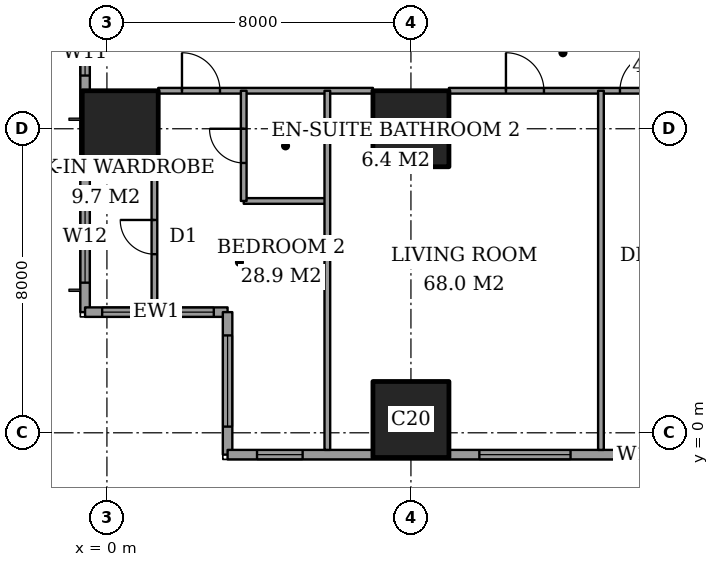
"""IFC4 building model, lengths in metres.
Left out: names, types, materials, properties, quantities, classifications, styles, units other than length and angle.
Written with IfcOpenShell. Run it as: python <this file> out.ifc"""

import sys

from ifc_helpers import new_model, si_unit, direction, frame, frame_2d, origin, origin_2d, place, context, subcontext, project, spatial, rectangle, extrude, element, fill, save


model = new_model("IFC4")
c1 = context("Model", 3, precision=1e-05, world=origin(), true_north=direction((0.0, 1.0)))
c2 = subcontext(c1, "Body", "Model", "MODEL_VIEW")
j1 = project(units=[si_unit("LENGTHUNIT", "METRE"), si_unit("PLANEANGLEUNIT", "RADIAN")], contexts=[c1])
p1 = place(None, origin())
s1 = spatial("IfcSite", under=j1, at=p1, CompositionType="ELEMENT")
p2 = place(p1, origin())
s2 = spatial("IfcBuilding", under=s1, at=p2, CompositionType="ELEMENT")
p3 = place(p2, frame((0.0, 0.0, 143.0)))
s3 = spatial("IfcBuildingStorey", under=s2, at=p3, CompositionType="ELEMENT", Elevation=143.0)
for number, where, z_axis, x_axis in (
    (1, (0.35, 8.0, 0.0), (0.0, 0.0, 1.0), (1.0, 0.0, 0.0)),
    (2, (8.0, 0.35, 0.0), (0.0, 0.0, 1.0), (1.0, 0.0, 0.0)),
    (3, (8.0, 8.0, 0.0), (0.0, 0.0, 1.0), (1.0, 0.0, 0.0)),
):
    element("IfcColumn", number, at=place(p3, frame(where, z_axis=z_axis, x_axis=x_axis)), inside=s3, PredefinedType="COLUMN", context=c2, shape_type="SweptSolid", body=[
        extrude(rectangle(XDim=2.0, YDim=2.0, at=origin_2d()), origin(), (0.0, 0.0, 1.0), 3.6),
    ])
p4 = place(p3, frame((-0.575, 44.825, 0.0), z_axis=(0.0, 0.0, 1.0), x_axis=(0.0, -1.0, 0.0)))
e4 = element("IfcWall", 4, at=p4, inside=s3, PredefinedType="SOLIDWALL", context=c2, shape_type="SweptSolid", body=[
    extrude(rectangle(XDim=41.65, YDim=0.25, at=frame_2d((20.825, 0.0))), origin(), (0.0, 0.0, 1.0), 3.6),
])
p5 = place(p4, frame((0.775, 0.0, 0.4)))
e5 = element("IfcOpeningElement", 5, at=p5, cuts=e4, PredefinedType="OPENING", context=c2, shape_type="SweptSolid", body=[
    extrude(rectangle(XDim=2.4, YDim=2.2, at=frame_2d((1.2, 1.1))), frame((0.0, 0.135, 0.0), z_axis=(0.0, -1.0, 0.0), x_axis=(1.0, 0.0, 0.0)), (0.0, 0.0, 1.0), 0.27),
])
p6 = place(p4, frame((6.1, 0.0, 0.4)))
e6 = element("IfcOpeningElement", 6, at=p6, cuts=e4, PredefinedType="OPENING", context=c2, shape_type="SweptSolid", body=[
    extrude(rectangle(XDim=1.2, YDim=2.2, at=frame_2d((0.6, 1.1))), frame((0.0, 0.135, 0.0), z_axis=(0.0, -1.0, 0.0), x_axis=(1.0, 0.0, 0.0)), (0.0, 0.0, 1.0), 0.27),
])
p7 = place(p4, frame((8.425, 0.0, 0.4)))
e7 = element("IfcOpeningElement", 7, at=p7, cuts=e4, PredefinedType="OPENING", context=c2, shape_type="SweptSolid", body=[
    extrude(rectangle(XDim=2.4, YDim=2.2, at=frame_2d((1.2, 1.1))), frame((0.0, 0.135, 0.0), z_axis=(0.0, -1.0, 0.0), x_axis=(1.0, 0.0, 0.0)), (0.0, 0.0, 1.0), 0.27),
])
p8 = place(p4, frame((15.625, 0.0, 0.4)))
e8 = element("IfcOpeningElement", 8, at=p8, cuts=e4, PredefinedType="OPENING", context=c2, shape_type="SweptSolid", body=[
    extrude(rectangle(XDim=2.4, YDim=2.2, at=frame_2d((1.2, 1.1))), frame((0.0, 0.135, 0.0), z_axis=(0.0, -1.0, 0.0), x_axis=(1.0, 0.0, 0.0)), (0.0, 0.0, 1.0), 0.27),
])
p9 = place(p4, frame((23.625, 0.0, 0.4)))
e9 = element("IfcOpeningElement", 9, at=p9, cuts=e4, PredefinedType="OPENING", context=c2, shape_type="SweptSolid", body=[
    extrude(rectangle(XDim=2.4, YDim=2.2, at=frame_2d((1.2, 1.1))), frame((0.0, 0.135, 0.0), z_axis=(0.0, -1.0, 0.0), x_axis=(1.0, 0.0, 0.0)), (0.0, 0.0, 1.0), 0.27),
])
p10 = place(p4, frame((30.625, 0.0, 0.4)))
e10 = element("IfcOpeningElement", 10, at=p10, cuts=e4, PredefinedType="OPENING", context=c2, shape_type="SweptSolid", body=[
    extrude(rectangle(XDim=2.4, YDim=2.2, at=frame_2d((1.2, 1.1))), frame((0.0, 0.135, 0.0), z_axis=(0.0, -1.0, 0.0), x_axis=(1.0, 0.0, 0.0)), (0.0, 0.0, 1.0), 0.27),
])
p11 = place(p4, frame((34.225, 0.0, 0.4)))
e11 = element("IfcOpeningElement", 11, at=p11, cuts=e4, PredefinedType="OPENING", context=c2, shape_type="SweptSolid", body=[
    extrude(rectangle(XDim=1.2, YDim=2.2, at=frame_2d((0.6, 1.1))), frame((0.0, 0.135, 0.0), z_axis=(0.0, -1.0, 0.0), x_axis=(1.0, 0.0, 0.0)), (0.0, 0.0, 1.0), 0.27),
])
p12 = place(p4, frame((38.475, 0.0, 0.4)))
e12 = element("IfcOpeningElement", 12, at=p12, cuts=e4, PredefinedType="OPENING", context=c2, shape_type="SweptSolid", body=[
    extrude(rectangle(XDim=2.4, YDim=2.2, at=frame_2d((1.2, 1.1))), frame((0.0, 0.135, 0.0), z_axis=(0.0, -1.0, 0.0), x_axis=(1.0, 0.0, 0.0)), (0.0, 0.0, 1.0), 0.27),
])
p13 = place(p3, frame((-0.575, 3.175, 0.0), z_axis=(0.0, 0.0, 1.0), x_axis=(1.0, 0.0, 0.0)))
e13 = element("IfcWall", 13, at=p13, inside=s3, PredefinedType="SOLIDWALL", context=c2, shape_type="SweptSolid", body=[
    extrude(rectangle(XDim=3.75, YDim=0.25, at=frame_2d((1.875, 0.0))), origin(), (0.0, 0.0, 1.0), 3.6),
])
p14 = place(p13, frame((0.45, 0.0, 0.4)))
e14 = element("IfcOpeningElement", 14, at=p14, cuts=e13, PredefinedType="OPENING", context=c2, shape_type="SweptSolid", body=[
    extrude(rectangle(XDim=1.2, YDim=2.2, at=frame_2d((0.6, 1.1))), frame((0.0, 0.135, 0.0), z_axis=(0.0, -1.0, 0.0), x_axis=(1.0, 0.0, 0.0)), (0.0, 0.0, 1.0), 0.27),
])
p15 = place(p13, frame((2.188, 0.0, 0.4)))
e15 = element("IfcOpeningElement", 15, at=p15, cuts=e13, PredefinedType="OPENING", context=c2, shape_type="SweptSolid", body=[
    extrude(rectangle(XDim=1.2, YDim=2.2, at=frame_2d((0.6, 1.1))), frame((0.0, 0.135, 0.0), z_axis=(0.0, -1.0, 0.0), x_axis=(1.0, 0.0, 0.0)), (0.0, 0.0, 1.0), 0.27),
])
p16 = place(p3, frame((3.175, 3.175, 0.0), z_axis=(0.0, 0.0, 1.0), x_axis=(0.0, -1.0, 0.0)))
e16 = element("IfcWall", 16, at=p16, inside=s3, PredefinedType="SOLIDWALL", context=c2, shape_type="SweptSolid", body=[
    extrude(rectangle(XDim=3.75, YDim=0.25, at=frame_2d((1.875, 0.0))), origin(), (0.0, 0.0, 1.0), 3.6),
])
p17 = place(p16, frame((0.613, 0.0, 0.4)))
e17 = element("IfcOpeningElement", 17, at=p17, cuts=e16, PredefinedType="OPENING", context=c2, shape_type="SweptSolid", body=[
    extrude(rectangle(XDim=2.4, YDim=2.2, at=frame_2d((1.2, 1.1))), frame((0.0, 0.135, 0.0), z_axis=(0.0, -1.0, 0.0), x_axis=(1.0, 0.0, 0.0)), (0.0, 0.0, 1.0), 0.27),
])
p18 = place(p3, frame((3.175, -0.575, 0.0), z_axis=(0.0, 0.0, 1.0), x_axis=(1.0, 0.0, 0.0)))
e18 = element("IfcWall", 18, at=p18, inside=s3, PredefinedType="SOLIDWALL", context=c2, shape_type="SweptSolid", body=[
    extrude(rectangle(XDim=21.4, YDim=0.25, at=frame_2d((10.7, 0.0))), origin(), (0.0, 0.0, 1.0), 3.6),
])
p19 = place(p18, frame((0.775, 0.0, 0.4)))
e19 = element("IfcOpeningElement", 19, at=p19, cuts=e18, PredefinedType="OPENING", context=c2, shape_type="SweptSolid", body=[
    extrude(rectangle(XDim=1.2, YDim=2.2, at=frame_2d((0.6, 1.1))), frame((0.0, 0.135, 0.0), z_axis=(0.0, -1.0, 0.0), x_axis=(1.0, 0.0, 0.0)), (0.0, 0.0, 1.0), 0.27),
])
p20 = place(p18, frame((6.625, 0.0, 0.4)))
e20 = element("IfcOpeningElement", 20, at=p20, cuts=e18, PredefinedType="OPENING", context=c2, shape_type="SweptSolid", body=[
    extrude(rectangle(XDim=2.4, YDim=2.2, at=frame_2d((1.2, 1.1))), frame((0.0, 0.135, 0.0), z_axis=(0.0, -1.0, 0.0), x_axis=(1.0, 0.0, 0.0)), (0.0, 0.0, 1.0), 0.27),
])
p21 = place(p18, frame((10.225, 0.0, 0.4)))
e21 = element("IfcOpeningElement", 21, at=p21, cuts=e18, PredefinedType="OPENING", context=c2, shape_type="SweptSolid", body=[
    extrude(rectangle(XDim=1.2, YDim=2.2, at=frame_2d((0.6, 1.1))), frame((0.0, 0.135, 0.0), z_axis=(0.0, -1.0, 0.0), x_axis=(1.0, 0.0, 0.0)), (0.0, 0.0, 1.0), 0.27),
])
p22 = place(p18, frame((15.875, 0.0, 0.4)))
e22 = element("IfcOpeningElement", 22, at=p22, cuts=e18, PredefinedType="OPENING", context=c2, shape_type="SweptSolid", body=[
    extrude(rectangle(XDim=2.4, YDim=2.2, at=frame_2d((1.2, 1.1))), frame((0.0, 0.135, 0.0), z_axis=(0.0, -1.0, 0.0), x_axis=(1.0, 0.0, 0.0)), (0.0, 0.0, 1.0), 0.27),
])
p23 = place(p3, frame((3.6, 6.1, 0.0), z_axis=(0.0, 0.0, 1.0), x_axis=(1.0, 0.0, 0.0)))
e23 = element("IfcWall", 23, at=p23, inside=s3, PredefinedType="PARTITIONING", context=c2, shape_type="SweptSolid", body=[
    extrude(rectangle(XDim=2.2, YDim=0.15, at=frame_2d((1.1, 0.0))), origin(), (0.0, 0.0, 1.0), 3.35),
])
p24 = place(p3, frame((1.35, 9.0, 0.0), z_axis=(0.0, 0.0, 1.0), x_axis=(1.0, 0.0, 0.0)))
e24 = element("IfcWall", 24, at=p24, inside=s3, PredefinedType="PARTITIONING", context=c2, shape_type="SweptSolid", body=[
    extrude(rectangle(XDim=5.65, YDim=0.15, at=frame_2d((2.825, 0.0))), origin(), (0.0, 0.0, 1.0), 3.35),
])
p25 = place(p24, frame((0.625, 0.0, 0.0)))
e25 = element("IfcOpeningElement", 25, at=p25, cuts=e24, PredefinedType="OPENING", context=c2, shape_type="SweptSolid", body=[
    extrude(rectangle(XDim=1.0, YDim=2.1, at=frame_2d((0.5, 1.05))), frame((0.0, 0.085, 0.0), z_axis=(0.0, -1.0, 0.0), x_axis=(1.0, 0.0, 0.0)), (0.0, 0.0, 1.0), 0.17),
])
p26 = place(p3, frame((9.0, 9.0, 0.0), z_axis=(0.0, 0.0, 1.0), x_axis=(1.0, 0.0, 0.0)))
e26 = element("IfcWall", 26, at=p26, inside=s3, PredefinedType="PARTITIONING", context=c2, shape_type="SweptSolid", body=[
    extrude(rectangle(XDim=6.0, YDim=0.15, at=frame_2d((3.0, 0.0))), origin(), (0.0, 0.0, 1.0), 3.35),
])
p27 = place(p26, frame((1.5, 0.0, 0.0)))
e27 = element("IfcOpeningElement", 27, at=p27, cuts=e26, PredefinedType="OPENING", context=c2, shape_type="SweptSolid", body=[
    extrude(rectangle(XDim=1.0, YDim=2.1, at=frame_2d((0.5, 1.05))), frame((0.0, 0.085, 0.0), z_axis=(0.0, -1.0, 0.0), x_axis=(1.0, 0.0, 0.0)), (0.0, 0.0, 1.0), 0.17),
])
p28 = place(p26, frame((4.5, 0.0, 0.0)))
e28 = element("IfcOpeningElement", 28, at=p28, cuts=e26, PredefinedType="OPENING", context=c2, shape_type="SweptSolid", body=[
    extrude(rectangle(XDim=1.0, YDim=2.1, at=frame_2d((0.5, 1.05))), frame((0.0, 0.085, 0.0), z_axis=(0.0, -1.0, 0.0), x_axis=(1.0, 0.0, 0.0)), (0.0, 0.0, 1.0), 0.17),
])
p29 = place(p3, frame((1.25, 3.3, 0.0), z_axis=(0.0, 0.0, 1.0), x_axis=(0.0, 1.0, 0.0)))
e29 = element("IfcWall", 29, at=p29, inside=s3, PredefinedType="PARTITIONING", context=c2, shape_type="SweptSolid", body=[
    extrude(rectangle(XDim=3.7, YDim=0.15, at=frame_2d((1.85, 0.0))), origin(), (0.0, 0.0, 1.0), 3.35),
])
p30 = place(p29, frame((1.4, 0.0, 0.0)))
e30 = element("IfcOpeningElement", 30, at=p30, cuts=e29, PredefinedType="OPENING", context=c2, shape_type="SweptSolid", body=[
    extrude(rectangle(XDim=0.9, YDim=2.1, at=frame_2d((0.45, 1.05))), frame((0.0, 0.085, 0.0), z_axis=(0.0, -1.0, 0.0), x_axis=(1.0, 0.0, 0.0)), (0.0, 0.0, 1.0), 0.17),
])
p31 = place(p3, frame((3.6, 6.1, 0.0), z_axis=(0.0, 0.0, 1.0), x_axis=(0.0, 1.0, 0.0)))
e31 = element("IfcWall", 31, at=p31, inside=s3, PredefinedType="PARTITIONING", context=c2, shape_type="SweptSolid", body=[
    extrude(rectangle(XDim=2.9, YDim=0.15, at=frame_2d((1.45, 0.0))), origin(), (0.0, 0.0, 1.0), 3.35),
])
p32 = place(p31, frame((1.0, 0.0, 0.0)))
e32 = element("IfcOpeningElement", 32, at=p32, cuts=e31, PredefinedType="OPENING", context=c2, shape_type="SweptSolid", body=[
    extrude(rectangle(XDim=0.9, YDim=2.1, at=frame_2d((0.45, 1.05))), frame((0.0, 0.085, 0.0), z_axis=(0.0, -1.0, 0.0), x_axis=(1.0, 0.0, 0.0)), (0.0, 0.0, 1.0), 0.17),
])
for number, where, z_axis, x_axis in (
    (33, (5.8, -0.45, 0.0), (0.0, 0.0, 1.0), (0.0, 1.0, 0.0)),
    (34, (13.0, -0.45, 0.0), (0.0, 0.0, 1.0), (0.0, 1.0, 0.0)),
):
    element("IfcWall", number, at=place(p3, frame(where, z_axis=z_axis, x_axis=x_axis)), inside=s3, PredefinedType="PARTITIONING", context=c2, shape_type="SweptSolid", body=[
        extrude(rectangle(XDim=9.45, YDim=0.15, at=frame_2d((4.725, 0.0))), origin(), (0.0, 0.0, 1.0), 3.35),
    ])
p33 = place(p11, origin())
e35 = element("IfcWindow", 35, at=p33, inside=s3, PartitioningType="SINGLE_PANEL", PredefinedType="WINDOW", context=c2, shape_type="SweptSolid", body=[
    extrude(rectangle(XDim=1.2, YDim=2.2, at=frame_2d((0.6, 1.1))), frame((0.0, 0.03, 0.0), z_axis=(0.0, -1.0, 0.0), x_axis=(1.0, 0.0, 0.0)), (0.0, 0.0, 1.0), 0.06),
])
fill(e11, e35)
p34 = place(p12, origin())
e36 = element("IfcWindow", 36, at=p34, inside=s3, PartitioningType="SINGLE_PANEL", PredefinedType="WINDOW", context=c2, shape_type="SweptSolid", body=[
    extrude(rectangle(XDim=2.4, YDim=2.2, at=frame_2d((1.2, 1.1))), frame((0.0, 0.03, 0.0), z_axis=(0.0, -1.0, 0.0), x_axis=(1.0, 0.0, 0.0)), (0.0, 0.0, 1.0), 0.06),
])
fill(e12, e36)
p35 = place(p14, origin())
e37 = element("IfcWindow", 37, at=p35, inside=s3, PartitioningType="SINGLE_PANEL", PredefinedType="WINDOW", context=c2, shape_type="SweptSolid", body=[
    extrude(rectangle(XDim=1.2, YDim=2.2, at=frame_2d((0.6, 1.1))), frame((0.0, 0.03, 0.0), z_axis=(0.0, -1.0, 0.0), x_axis=(1.0, 0.0, 0.0)), (0.0, 0.0, 1.0), 0.06),
])
fill(e14, e37)
p36 = place(p15, origin())
e38 = element("IfcWindow", 38, at=p36, inside=s3, PartitioningType="SINGLE_PANEL", PredefinedType="WINDOW", context=c2, shape_type="SweptSolid", body=[
    extrude(rectangle(XDim=1.2, YDim=2.2, at=frame_2d((0.6, 1.1))), frame((0.0, 0.03, 0.0), z_axis=(0.0, -1.0, 0.0), x_axis=(1.0, 0.0, 0.0)), (0.0, 0.0, 1.0), 0.06),
])
fill(e15, e38)
p37 = place(p17, origin())
e39 = element("IfcWindow", 39, at=p37, inside=s3, PartitioningType="SINGLE_PANEL", PredefinedType="WINDOW", context=c2, shape_type="SweptSolid", body=[
    extrude(rectangle(XDim=2.4, YDim=2.2, at=frame_2d((1.2, 1.1))), frame((0.0, 0.03, 0.0), z_axis=(0.0, -1.0, 0.0), x_axis=(1.0, 0.0, 0.0)), (0.0, 0.0, 1.0), 0.06),
])
fill(e17, e39)
p38 = place(p19, origin())
e40 = element("IfcWindow", 40, at=p38, inside=s3, PartitioningType="SINGLE_PANEL", PredefinedType="WINDOW", context=c2, shape_type="SweptSolid", body=[
    extrude(rectangle(XDim=1.2, YDim=2.2, at=frame_2d((0.6, 1.1))), frame((0.0, 0.03, 0.0), z_axis=(0.0, -1.0, 0.0), x_axis=(1.0, 0.0, 0.0)), (0.0, 0.0, 1.0), 0.06),
])
fill(e19, e40)
p39 = place(p20, origin())
e41 = element("IfcWindow", 41, at=p39, inside=s3, PartitioningType="SINGLE_PANEL", PredefinedType="WINDOW", context=c2, shape_type="SweptSolid", body=[
    extrude(rectangle(XDim=2.4, YDim=2.2, at=frame_2d((1.2, 1.1))), frame((0.0, 0.03, 0.0), z_axis=(0.0, -1.0, 0.0), x_axis=(1.0, 0.0, 0.0)), (0.0, 0.0, 1.0), 0.06),
])
fill(e20, e41)
p40 = place(p21, origin())
e42 = element("IfcWindow", 42, at=p40, inside=s3, PartitioningType="SINGLE_PANEL", PredefinedType="WINDOW", context=c2, shape_type="SweptSolid", body=[
    extrude(rectangle(XDim=1.2, YDim=2.2, at=frame_2d((0.6, 1.1))), frame((0.0, 0.03, 0.0), z_axis=(0.0, -1.0, 0.0), x_axis=(1.0, 0.0, 0.0)), (0.0, 0.0, 1.0), 0.06),
])
fill(e21, e42)
p41 = place(p30, origin())
e43 = element("IfcDoor", 43, at=p41, inside=s3, OperationType="SINGLE_SWING_LEFT", PredefinedType="DOOR", context=c2, shape_type="SweptSolid", body=[
    extrude(rectangle(XDim=0.9, YDim=2.1, at=frame_2d((0.45, 1.05))), frame((0.0, 0.025, 0.0), z_axis=(0.0, -1.0, 0.0), x_axis=(1.0, 0.0, 0.0)), (0.0, 0.0, 1.0), 0.05),
])
fill(e30, e43)
p42 = place(p32, origin())
e44 = element("IfcDoor", 44, at=p42, inside=s3, OperationType="SINGLE_SWING_LEFT", PredefinedType="DOOR", context=c2, shape_type="SweptSolid", body=[
    extrude(rectangle(XDim=0.9, YDim=2.1, at=frame_2d((0.45, 1.05))), frame((0.0, 0.025, 0.0), z_axis=(0.0, -1.0, 0.0), x_axis=(1.0, 0.0, 0.0)), (0.0, 0.0, 1.0), 0.05),
])
fill(e32, e44)
p43 = place(p25, origin())
e45 = element("IfcDoor", 45, at=p43, inside=s3, OperationType="SINGLE_SWING_RIGHT", PredefinedType="DOOR", context=c2, shape_type="SweptSolid", body=[
    extrude(rectangle(XDim=1.0, YDim=2.1, at=frame_2d((0.5, 1.05))), frame((0.0, 0.025, 0.0), z_axis=(0.0, -1.0, 0.0), x_axis=(1.0, 0.0, 0.0)), (0.0, 0.0, 1.0), 0.05),
])
fill(e25, e45)
p44 = place(p27, origin())
e46 = element("IfcDoor", 46, at=p44, inside=s3, OperationType="SINGLE_SWING_RIGHT", PredefinedType="DOOR", context=c2, shape_type="SweptSolid", body=[
    extrude(rectangle(XDim=1.0, YDim=2.1, at=frame_2d((0.5, 1.05))), frame((0.0, 0.025, 0.0), z_axis=(0.0, -1.0, 0.0), x_axis=(1.0, 0.0, 0.0)), (0.0, 0.0, 1.0), 0.05),
])
fill(e27, e46)
p45 = place(p28, origin())
e47 = element("IfcDoor", 47, at=p45, inside=s3, OperationType="SINGLE_SWING_LEFT", PredefinedType="DOOR", context=c2, shape_type="SweptSolid", body=[
    extrude(rectangle(XDim=1.0, YDim=2.1, at=frame_2d((0.5, 1.05))), frame((0.0, 0.025, 0.0), z_axis=(0.0, -1.0, 0.0), x_axis=(1.0, 0.0, 0.0)), (0.0, 0.0, 1.0), 0.05),
])
fill(e28, e47)
save(model, sys.argv[1])
